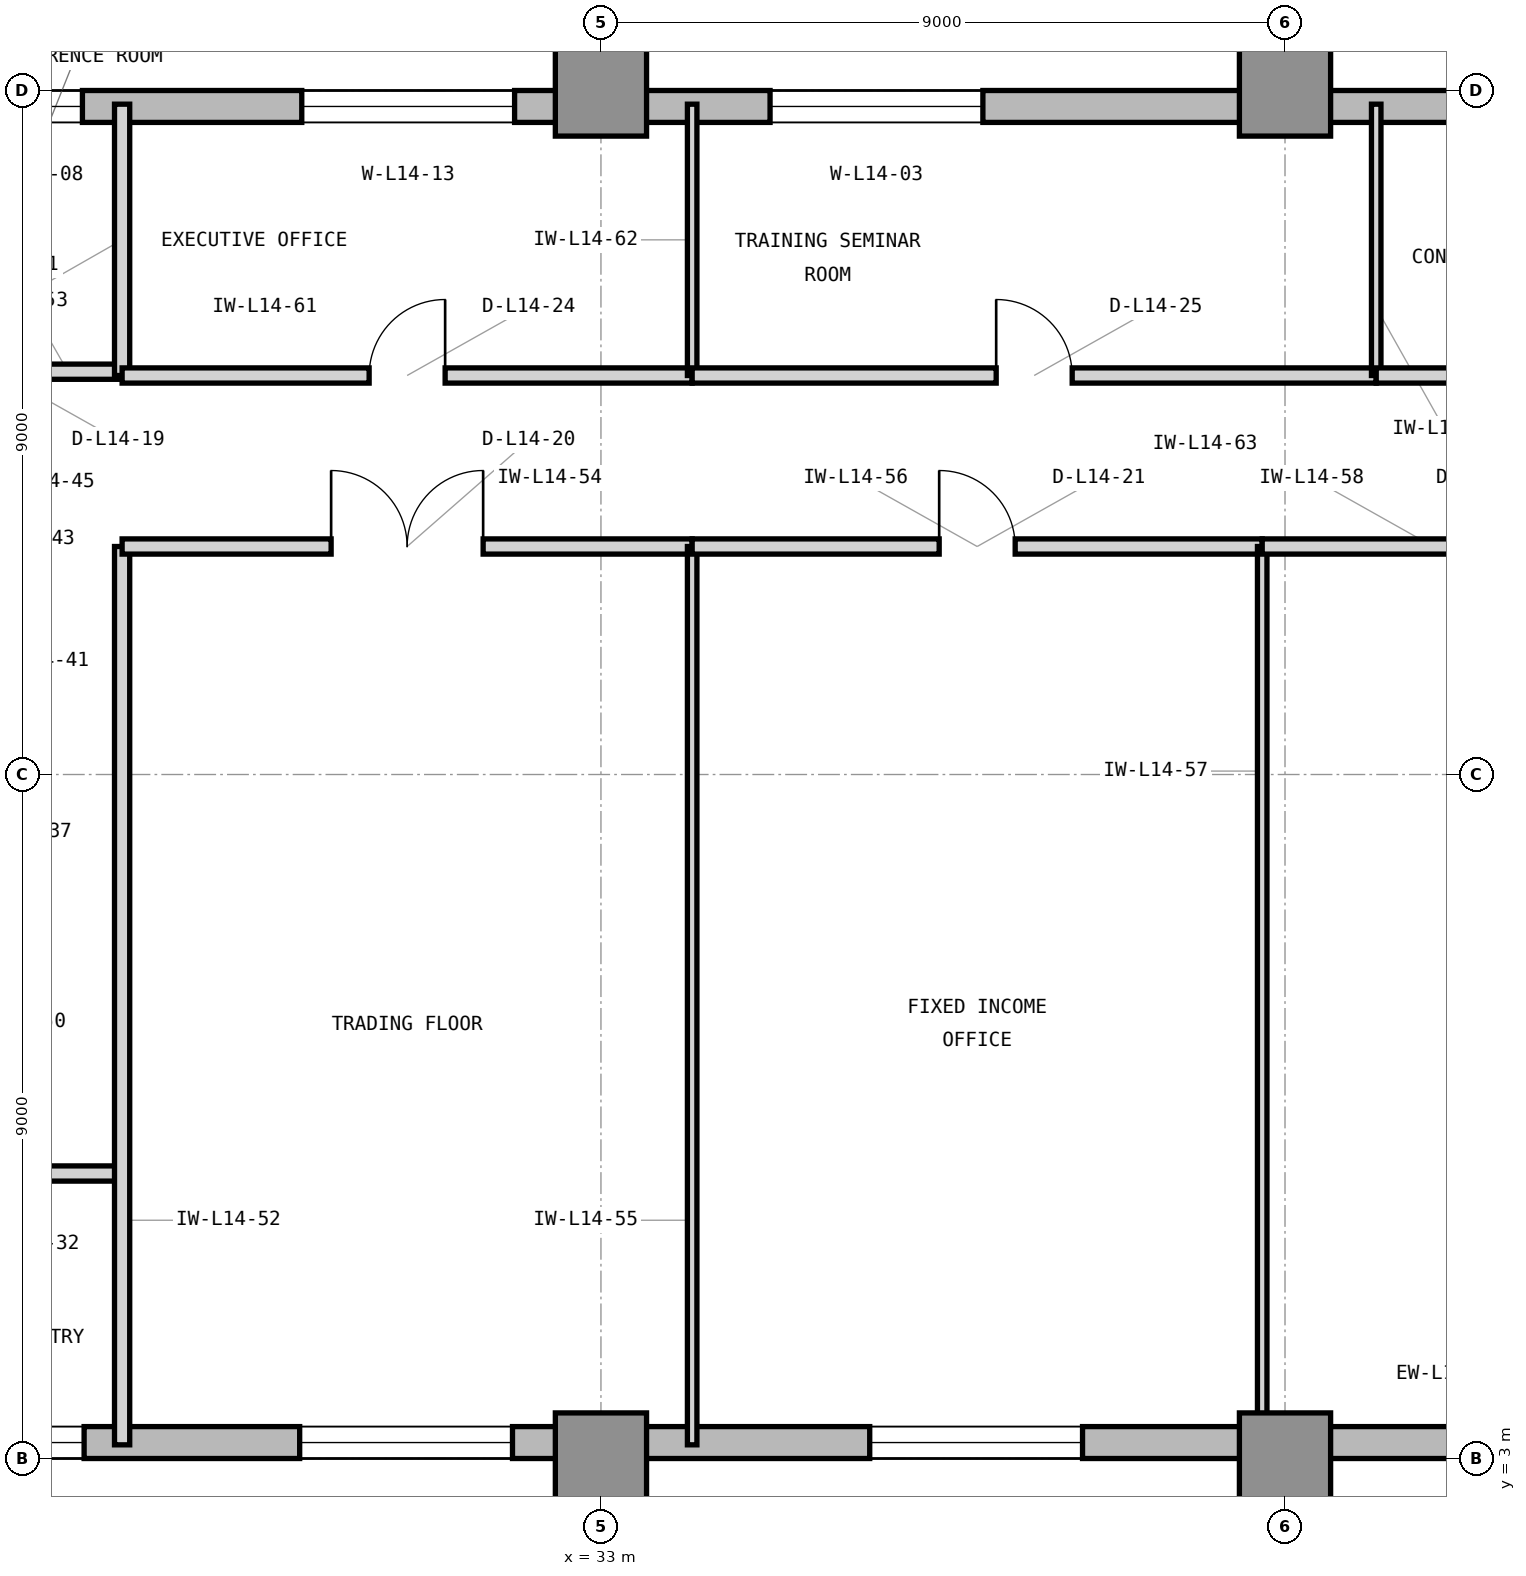
"""IFC4 building model, lengths in metres.
Left out: names, types, materials, properties, quantities, classifications, styles, units other than length and angle.
Written with IfcOpenShell. Run it as: python <this file> out.ifc"""

import sys

from ifc_helpers import new_model, si_unit, direction, frame, frame_2d, origin, origin_2d, place, context, subcontext, project, spatial, rectangle, extrude, element, fill, save


model = new_model("IFC4")
c1 = context("Model", 3, precision=1e-05, world=origin(), true_north=direction((0.0, 1.0)))
c2 = subcontext(c1, "Body", "Model", "MODEL_VIEW")
j1 = project(units=[si_unit("LENGTHUNIT", "METRE"), si_unit("PLANEANGLEUNIT", "RADIAN")], contexts=[c1])
p1 = place(None, origin())
s1 = spatial("IfcSite", under=j1, at=p1, CompositionType="ELEMENT")
p2 = place(p1, origin())
s2 = spatial("IfcBuilding", under=s1, at=p2, CompositionType="ELEMENT")
p3 = place(p2, frame((0.0, 0.0, 63.6)))
s3 = spatial("IfcBuildingStorey", under=s2, at=p3, CompositionType="ELEMENT", Elevation=63.6)
for number, where, z_axis, x_axis in (
    (1, (33.0, 3.0, 0.0), (0.0, 0.0, 1.0), (1.0, 0.0, 0.0)),
    (2, (33.0, 21.0, 0.0), (0.0, 0.0, 1.0), (1.0, 0.0, 0.0)),
    (3, (42.0, 3.0, 0.0), (0.0, 0.0, 1.0), (1.0, 0.0, 0.0)),
    (4, (42.0, 21.0, 0.0), (0.0, 0.0, 1.0), (1.0, 0.0, 0.0)),
):
    element("IfcColumn", number, at=place(p3, frame(where, z_axis=z_axis, x_axis=x_axis)), inside=s3, PredefinedType="COLUMN", context=c2, shape_type="SweptSolid", body=[
        extrude(rectangle(XDim=1.2, YDim=1.2, at=origin_2d()), origin(), (0.0, 0.0, 1.0), 4.2),
    ])
p4 = place(p3, frame((23.9, 3.21, 0.0), z_axis=(0.0, 0.0, 1.0), x_axis=(1.0, 0.0, 0.0)))
e5 = element("IfcWall", 5, at=p4, inside=s3, PredefinedType="STANDARD", context=c2, shape_type="SweptSolid", body=[
    extrude(rectangle(XDim=40.5, YDim=0.42, at=frame_2d((20.25, 0.0))), origin(), (0.0, 0.0, 1.0), 3.98),
])
p5 = place(p4, frame((1.1, 0.0, 0.85)))
e6 = element("IfcOpeningElement", 6, at=p5, cuts=e5, PredefinedType="OPENING", context=c2, shape_type="SweptSolid", body=[
    extrude(rectangle(XDim=1.2, YDim=2.45, at=frame_2d((0.6, 1.225))), frame((0.0, 0.22, 0.0), z_axis=(0.0, -1.0, 0.0), x_axis=(1.0, 0.0, 0.0)), (0.0, 0.0, 1.0), 0.44),
])
p6 = place(p4, frame((5.136, 0.0, 0.85)))
e7 = element("IfcOpeningElement", 7, at=p6, cuts=e5, PredefinedType="OPENING", context=c2, shape_type="SweptSolid", body=[
    extrude(rectangle(XDim=2.8, YDim=2.45, at=frame_2d((1.4, 1.225))), frame((0.0, 0.22, 0.0), z_axis=(0.0, -1.0, 0.0), x_axis=(1.0, 0.0, 0.0)), (0.0, 0.0, 1.0), 0.44),
])
p7 = place(p4, frame((12.636, 0.0, 0.85)))
e8 = element("IfcOpeningElement", 8, at=p7, cuts=e5, PredefinedType="OPENING", context=c2, shape_type="SweptSolid", body=[
    extrude(rectangle(XDim=2.8, YDim=2.45, at=frame_2d((1.4, 1.225))), frame((0.0, 0.22, 0.0), z_axis=(0.0, -1.0, 0.0), x_axis=(1.0, 0.0, 0.0)), (0.0, 0.0, 1.0), 0.44),
])
p8 = place(p4, frame((20.336, 0.0, 0.85)))
e9 = element("IfcOpeningElement", 9, at=p8, cuts=e5, PredefinedType="OPENING", context=c2, shape_type="SweptSolid", body=[
    extrude(rectangle(XDim=2.8, YDim=2.45, at=frame_2d((1.4, 1.225))), frame((0.0, 0.22, 0.0), z_axis=(0.0, -1.0, 0.0), x_axis=(1.0, 0.0, 0.0)), (0.0, 0.0, 1.0), 0.44),
])
p9 = place(p4, frame((30.886, 0.0, 0.85)))
e10 = element("IfcOpeningElement", 10, at=p9, cuts=e5, PredefinedType="OPENING", context=c2, shape_type="SweptSolid", body=[
    extrude(rectangle(XDim=1.2, YDim=2.45, at=frame_2d((0.6, 1.225))), frame((0.0, 0.22, 0.0), z_axis=(0.0, -1.0, 0.0), x_axis=(1.0, 0.0, 0.0)), (0.0, 0.0, 1.0), 0.44),
])
p10 = place(p3, frame((64.4, 20.79, 0.0), z_axis=(0.0, 0.0, 1.0), x_axis=(-1.0, 0.0, 0.0)))
e11 = element("IfcWall", 11, at=p10, inside=s3, PredefinedType="STANDARD", context=c2, shape_type="SweptSolid", body=[
    extrude(rectangle(XDim=40.4, YDim=0.42, at=frame_2d((20.2, 0.0))), origin(), (0.0, 0.0, 1.0), 3.98),
])
p11 = place(p10, frame((26.375, 0.0, 0.85)))
e12 = element("IfcOpeningElement", 12, at=p11, cuts=e11, PredefinedType="OPENING", context=c2, shape_type="SweptSolid", body=[
    extrude(rectangle(XDim=2.8, YDim=2.45, at=frame_2d((1.4, 1.225))), frame((0.0, 0.22, 0.0), z_axis=(0.0, -1.0, 0.0), x_axis=(1.0, 0.0, 0.0)), (0.0, 0.0, 1.0), 0.44),
])
p12 = place(p10, frame((38.222, 0.0, 0.85)))
e13 = element("IfcOpeningElement", 13, at=p12, cuts=e11, PredefinedType="OPENING", context=c2, shape_type="SweptSolid", body=[
    extrude(rectangle(XDim=1.2, YDim=2.45, at=frame_2d((0.6, 1.225))), frame((0.0, 0.22, 0.0), z_axis=(0.0, -1.0, 0.0), x_axis=(1.0, 0.0, 0.0)), (0.0, 0.0, 1.0), 0.44),
])
p13 = place(p10, frame((32.536, 0.0, 0.85)))
e14 = element("IfcOpeningElement", 14, at=p13, cuts=e11, PredefinedType="OPENING", context=c2, shape_type="SweptSolid", body=[
    extrude(rectangle(XDim=2.8, YDim=2.45, at=frame_2d((1.4, 1.225))), frame((0.0, 0.22, 0.0), z_axis=(0.0, -1.0, 0.0), x_axis=(1.0, 0.0, 0.0)), (0.0, 0.0, 1.0), 0.44),
])
p14 = place(p10, frame((17.386, 0.0, 0.85)))
e15 = element("IfcOpeningElement", 15, at=p14, cuts=e11, PredefinedType="OPENING", context=c2, shape_type="SweptSolid", body=[
    extrude(rectangle(XDim=2.8, YDim=2.45, at=frame_2d((1.4, 1.225))), frame((0.0, 0.22, 0.0), z_axis=(0.0, -1.0, 0.0), x_axis=(1.0, 0.0, 0.0)), (0.0, 0.0, 1.0), 0.44),
])
p15 = place(p3, frame((23.85, 6.75, 0.0), z_axis=(0.0, 0.0, 1.0), x_axis=(1.0, 0.0, 0.0)))
e16 = element("IfcWall", 16, at=p15, inside=s3, PredefinedType="PARTITIONING", context=c2, shape_type="SweptSolid", body=[
    extrude(rectangle(XDim=2.85, YDim=0.2, at=frame_2d((1.425, 0.0))), origin(), (0.0, 0.0, 1.0), 3.97),
])
p16 = place(p15, frame((0.7, 0.0, 0.0)))
e17 = element("IfcOpeningElement", 17, at=p16, cuts=e16, PredefinedType="OPENING", context=c2, shape_type="SweptSolid", body=[
    extrude(rectangle(XDim=1.0, YDim=2.15, at=frame_2d((0.5, 1.075))), frame((0.0, 0.11, 0.0), z_axis=(0.0, -1.0, 0.0), x_axis=(1.0, 0.0, 0.0)), (0.0, 0.0, 1.0), 0.22),
])
p17 = place(p3, frame((23.85, 17.3, 0.0), z_axis=(0.0, 0.0, 1.0), x_axis=(1.0, 0.0, 0.0)))
e18 = element("IfcWall", 18, at=p17, inside=s3, PredefinedType="PARTITIONING", context=c2, shape_type="SweptSolid", body=[
    extrude(rectangle(XDim=2.85, YDim=0.2, at=frame_2d((1.425, 0.0))), origin(), (0.0, 0.0, 1.0), 3.97),
])
p18 = place(p17, frame((0.7, 0.0, 0.0)))
e19 = element("IfcOpeningElement", 19, at=p18, cuts=e18, PredefinedType="OPENING", context=c2, shape_type="SweptSolid", body=[
    extrude(rectangle(XDim=1.0, YDim=2.15, at=frame_2d((0.5, 1.075))), frame((0.0, 0.11, 0.0), z_axis=(0.0, -1.0, 0.0), x_axis=(1.0, 0.0, 0.0)), (0.0, 0.0, 1.0), 0.22),
])
p19 = place(p3, frame((26.7, 3.18, 0.0), z_axis=(0.0, 0.0, 1.0), x_axis=(0.0, 1.0, 0.0)))
e20 = element("IfcWall", 20, at=p19, inside=s3, PredefinedType="PARTITIONING", context=c2, shape_type="SweptSolid", body=[
    extrude(rectangle(XDim=11.82, YDim=0.2, at=frame_2d((5.91, 0.0))), origin(), (0.0, 0.0, 1.0), 3.97),
])
p20 = place(p3, frame((26.7, 17.25, 0.0), z_axis=(0.0, 0.0, 1.0), x_axis=(0.0, 1.0, 0.0)))
e21 = element("IfcWall", 21, at=p20, inside=s3, PredefinedType="PARTITIONING", context=c2, shape_type="SweptSolid", body=[
    extrude(rectangle(XDim=3.57, YDim=0.2, at=frame_2d((1.785, 0.0))), origin(), (0.0, 0.0, 1.0), 3.97),
])
p21 = place(p3, frame((26.7, 15.0, 0.0), z_axis=(0.0, 0.0, 1.0), x_axis=(1.0, 0.0, 0.0)))
e22 = element("IfcWall", 22, at=p21, inside=s3, PredefinedType="PARTITIONING", context=c2, shape_type="SweptSolid", body=[
    extrude(rectangle(XDim=7.5, YDim=0.2, at=frame_2d((3.75, 0.0))), origin(), (0.0, 0.0, 1.0), 3.426),
])
p22 = place(p21, frame((2.75, 0.0, 0.0)))
e23 = element("IfcOpeningElement", 23, at=p22, cuts=e22, PredefinedType="OPENING", context=c2, shape_type="SweptSolid", body=[
    extrude(rectangle(XDim=2.0, YDim=2.5, at=frame_2d((1.0, 1.25))), frame((0.0, 0.11, 0.0), z_axis=(0.0, -1.0, 0.0), x_axis=(1.0, 0.0, 0.0)), (0.0, 0.0, 1.0), 0.22),
])
p23 = place(p3, frame((34.2, 3.18, 0.0), z_axis=(0.0, 0.0, 1.0), x_axis=(0.0, 1.0, 0.0)))
e24 = element("IfcWall", 24, at=p23, inside=s3, PredefinedType="PARTITIONING", context=c2, shape_type="SweptSolid", body=[
    extrude(rectangle(XDim=11.82, YDim=0.125, at=frame_2d((5.91, 0.0))), origin(), (0.0, 0.0, 1.0), 3.97),
])
p24 = place(p3, frame((34.2, 15.0, 0.0), z_axis=(0.0, 0.0, 1.0), x_axis=(1.0, 0.0, 0.0)))
e25 = element("IfcWall", 25, at=p24, inside=s3, PredefinedType="PARTITIONING", context=c2, shape_type="SweptSolid", body=[
    extrude(rectangle(XDim=7.5, YDim=0.2, at=frame_2d((3.75, 0.0))), origin(), (0.0, 0.0, 1.0), 3.426),
])
p25 = place(p24, frame((3.25, 0.0, 0.0)))
e26 = element("IfcOpeningElement", 26, at=p25, cuts=e25, PredefinedType="OPENING", context=c2, shape_type="SweptSolid", body=[
    extrude(rectangle(XDim=1.0, YDim=2.15, at=frame_2d((0.5, 1.075))), frame((0.0, 0.11, 0.0), z_axis=(0.0, -1.0, 0.0), x_axis=(1.0, 0.0, 0.0)), (0.0, 0.0, 1.0), 0.22),
])
p26 = place(p3, frame((41.7, 3.18, 0.0), z_axis=(0.0, 0.0, 1.0), x_axis=(0.0, 1.0, 0.0)))
e27 = element("IfcWall", 27, at=p26, inside=s3, PredefinedType="PARTITIONING", context=c2, shape_type="SweptSolid", body=[
    extrude(rectangle(XDim=11.82, YDim=0.125, at=frame_2d((5.91, 0.0))), origin(), (0.0, 0.0, 1.0), 3.97),
])
p27 = place(p3, frame((41.7, 15.0, 0.0), z_axis=(0.0, 0.0, 1.0), x_axis=(1.0, 0.0, 0.0)))
e28 = element("IfcWall", 28, at=p27, inside=s3, PredefinedType="PARTITIONING", context=c2, shape_type="SweptSolid", body=[
    extrude(rectangle(XDim=9.0, YDim=0.2, at=frame_2d((4.5, 0.0))), origin(), (0.0, 0.0, 1.0), 3.426),
])
p28 = place(p27, frame((4.0, 0.0, 0.0)))
e29 = element("IfcOpeningElement", 29, at=p28, cuts=e28, PredefinedType="OPENING", context=c2, shape_type="SweptSolid", body=[
    extrude(rectangle(XDim=1.0, YDim=2.15, at=frame_2d((0.5, 1.075))), frame((0.0, 0.11, 0.0), z_axis=(0.0, -1.0, 0.0), x_axis=(1.0, 0.0, 0.0)), (0.0, 0.0, 1.0), 0.22),
])
p29 = place(p3, frame((26.7, 17.25, 0.0), z_axis=(0.0, 0.0, 1.0), x_axis=(1.0, 0.0, 0.0)))
e30 = element("IfcWall", 30, at=p29, inside=s3, PredefinedType="PARTITIONING", context=c2, shape_type="SweptSolid", body=[
    extrude(rectangle(XDim=7.5, YDim=0.2, at=frame_2d((3.75, 0.0))), origin(), (0.0, 0.0, 1.0), 3.97),
])
p30 = place(p29, frame((3.25, 0.0, 0.0)))
e31 = element("IfcOpeningElement", 31, at=p30, cuts=e30, PredefinedType="OPENING", context=c2, shape_type="SweptSolid", body=[
    extrude(rectangle(XDim=1.0, YDim=2.15, at=frame_2d((0.5, 1.075))), frame((0.0, 0.11, 0.0), z_axis=(0.0, -1.0, 0.0), x_axis=(1.0, 0.0, 0.0)), (0.0, 0.0, 1.0), 0.22),
])
p31 = place(p3, frame((34.2, 17.25, 0.0), z_axis=(0.0, 0.0, 1.0), x_axis=(0.0, 1.0, 0.0)))
e32 = element("IfcWall", 32, at=p31, inside=s3, PredefinedType="PARTITIONING", context=c2, shape_type="SweptSolid", body=[
    extrude(rectangle(XDim=3.57, YDim=0.125, at=frame_2d((1.785, 0.0))), origin(), (0.0, 0.0, 1.0), 3.97),
])
p32 = place(p3, frame((34.2, 17.25, 0.0), z_axis=(0.0, 0.0, 1.0), x_axis=(1.0, 0.0, 0.0)))
e33 = element("IfcWall", 33, at=p32, inside=s3, PredefinedType="PARTITIONING", context=c2, shape_type="SweptSolid", body=[
    extrude(rectangle(XDim=9.0, YDim=0.2, at=frame_2d((4.5, 0.0))), origin(), (0.0, 0.0, 1.0), 3.97),
])
p33 = place(p32, frame((4.0, 0.0, 0.0)))
e34 = element("IfcOpeningElement", 34, at=p33, cuts=e33, PredefinedType="OPENING", context=c2, shape_type="SweptSolid", body=[
    extrude(rectangle(XDim=1.0, YDim=2.15, at=frame_2d((0.5, 1.075))), frame((0.0, 0.11, 0.0), z_axis=(0.0, -1.0, 0.0), x_axis=(1.0, 0.0, 0.0)), (0.0, 0.0, 1.0), 0.22),
])
p34 = place(p3, frame((43.2, 17.25, 0.0), z_axis=(0.0, 0.0, 1.0), x_axis=(0.0, 1.0, 0.0)))
e35 = element("IfcWall", 35, at=p34, inside=s3, PredefinedType="PARTITIONING", context=c2, shape_type="SweptSolid", body=[
    extrude(rectangle(XDim=3.57, YDim=0.125, at=frame_2d((1.785, 0.0))), origin(), (0.0, 0.0, 1.0), 3.97),
])
p35 = place(p3, frame((43.2, 17.25, 0.0), z_axis=(0.0, 0.0, 1.0), x_axis=(1.0, 0.0, 0.0)))
e36 = element("IfcWall", 36, at=p35, inside=s3, PredefinedType="PARTITIONING", context=c2, shape_type="SweptSolid", body=[
    extrude(rectangle(XDim=15.3, YDim=0.2, at=frame_2d((7.65, 0.0))), origin(), (0.0, 0.0, 1.0), 3.97),
])
p36 = place(p35, frame((6.9, 0.0, 0.0)))
e37 = element("IfcOpeningElement", 37, at=p36, cuts=e36, PredefinedType="OPENING", context=c2, shape_type="SweptSolid", body=[
    extrude(rectangle(XDim=1.5, YDim=2.3, at=frame_2d((0.75, 1.15))), frame((0.0, 0.11, 0.0), z_axis=(0.0, -1.0, 0.0), x_axis=(1.0, 0.0, 0.0)), (0.0, 0.0, 1.0), 0.22),
])
p37 = place(p11, origin())
e38 = element("IfcWindow", 38, at=p37, inside=s3, PartitioningType="SINGLE_PANEL", PredefinedType="WINDOW", context=c2, shape_type="SweptSolid", body=[
    extrude(rectangle(XDim=2.8, YDim=2.45, at=frame_2d((1.4, 1.225))), frame((0.0, 0.11, 0.0), z_axis=(0.0, -1.0, 0.0), x_axis=(1.0, 0.0, 0.0)), (0.0, 0.0, 1.0), 0.06),
])
fill(e12, e38)
p38 = place(p22, origin())
e39 = element("IfcDoor", 39, at=p38, inside=s3, OperationType="DOUBLE_DOOR_SINGLE_SWING", PredefinedType="DOOR", context=c2, shape_type="SweptSolid", body=[
    extrude(rectangle(XDim=2.0, YDim=2.5, at=frame_2d((1.0, 1.25))), frame((0.0, 0.025, 0.0), z_axis=(0.0, -1.0, 0.0), x_axis=(1.0, 0.0, 0.0)), (0.0, 0.0, 1.0), 0.05),
])
fill(e23, e39)
p39 = place(p25, origin())
e40 = element("IfcDoor", 40, at=p39, inside=s3, OperationType="SINGLE_SWING_LEFT", PredefinedType="DOOR", context=c2, shape_type="SweptSolid", body=[
    extrude(rectangle(XDim=1.0, YDim=2.15, at=frame_2d((0.5, 1.075))), frame((0.0, 0.025, 0.0), z_axis=(0.0, -1.0, 0.0), x_axis=(1.0, 0.0, 0.0)), (0.0, 0.0, 1.0), 0.05),
])
fill(e26, e40)
p40 = place(p30, origin())
e41 = element("IfcDoor", 41, at=p40, inside=s3, OperationType="SINGLE_SWING_RIGHT", PredefinedType="DOOR", context=c2, shape_type="SweptSolid", body=[
    extrude(rectangle(XDim=1.0, YDim=2.15, at=frame_2d((0.5, 1.075))), frame((0.0, 0.025, 0.0), z_axis=(0.0, -1.0, 0.0), x_axis=(1.0, 0.0, 0.0)), (0.0, 0.0, 1.0), 0.05),
])
fill(e31, e41)
p41 = place(p33, origin())
e42 = element("IfcDoor", 42, at=p41, inside=s3, OperationType="SINGLE_SWING_LEFT", PredefinedType="DOOR", context=c2, shape_type="SweptSolid", body=[
    extrude(rectangle(XDim=1.0, YDim=2.15, at=frame_2d((0.5, 1.075))), frame((0.0, 0.025, 0.0), z_axis=(0.0, -1.0, 0.0), x_axis=(1.0, 0.0, 0.0)), (0.0, 0.0, 1.0), 0.05),
])
fill(e34, e42)
p42 = place(p5, origin())
e43 = element("IfcWindow", 43, at=p42, inside=s3, PartitioningType="SINGLE_PANEL", PredefinedType="WINDOW", context=c2, shape_type="SweptSolid", body=[
    extrude(rectangle(XDim=1.2, YDim=2.45, at=frame_2d((0.6, 1.225))), frame((0.0, 0.11, 0.0), z_axis=(0.0, -1.0, 0.0), x_axis=(1.0, 0.0, 0.0)), (0.0, 0.0, 1.0), 0.06),
])
fill(e6, e43)
p43 = place(p12, origin())
e44 = element("IfcWindow", 44, at=p43, inside=s3, PartitioningType="SINGLE_PANEL", PredefinedType="WINDOW", context=c2, shape_type="SweptSolid", body=[
    extrude(rectangle(XDim=1.2, YDim=2.45, at=frame_2d((0.6, 1.225))), frame((0.0, 0.11, 0.0), z_axis=(0.0, -1.0, 0.0), x_axis=(1.0, 0.0, 0.0)), (0.0, 0.0, 1.0), 0.06),
])
fill(e13, e44)
p44 = place(p6, origin())
e45 = element("IfcWindow", 45, at=p44, inside=s3, PartitioningType="SINGLE_PANEL", PredefinedType="WINDOW", context=c2, shape_type="SweptSolid", body=[
    extrude(rectangle(XDim=2.8, YDim=2.45, at=frame_2d((1.4, 1.225))), frame((0.0, 0.11, 0.0), z_axis=(0.0, -1.0, 0.0), x_axis=(1.0, 0.0, 0.0)), (0.0, 0.0, 1.0), 0.06),
])
fill(e7, e45)
p45 = place(p7, origin())
e46 = element("IfcWindow", 46, at=p45, inside=s3, PartitioningType="SINGLE_PANEL", PredefinedType="WINDOW", context=c2, shape_type="SweptSolid", body=[
    extrude(rectangle(XDim=2.8, YDim=2.45, at=frame_2d((1.4, 1.225))), frame((0.0, 0.11, 0.0), z_axis=(0.0, -1.0, 0.0), x_axis=(1.0, 0.0, 0.0)), (0.0, 0.0, 1.0), 0.06),
])
fill(e8, e46)
p46 = place(p13, origin())
e47 = element("IfcWindow", 47, at=p46, inside=s3, PartitioningType="SINGLE_PANEL", PredefinedType="WINDOW", context=c2, shape_type="SweptSolid", body=[
    extrude(rectangle(XDim=2.8, YDim=2.45, at=frame_2d((1.4, 1.225))), frame((0.0, 0.11, 0.0), z_axis=(0.0, -1.0, 0.0), x_axis=(1.0, 0.0, 0.0)), (0.0, 0.0, 1.0), 0.06),
])
fill(e14, e47)
save(model, sys.argv[1])
